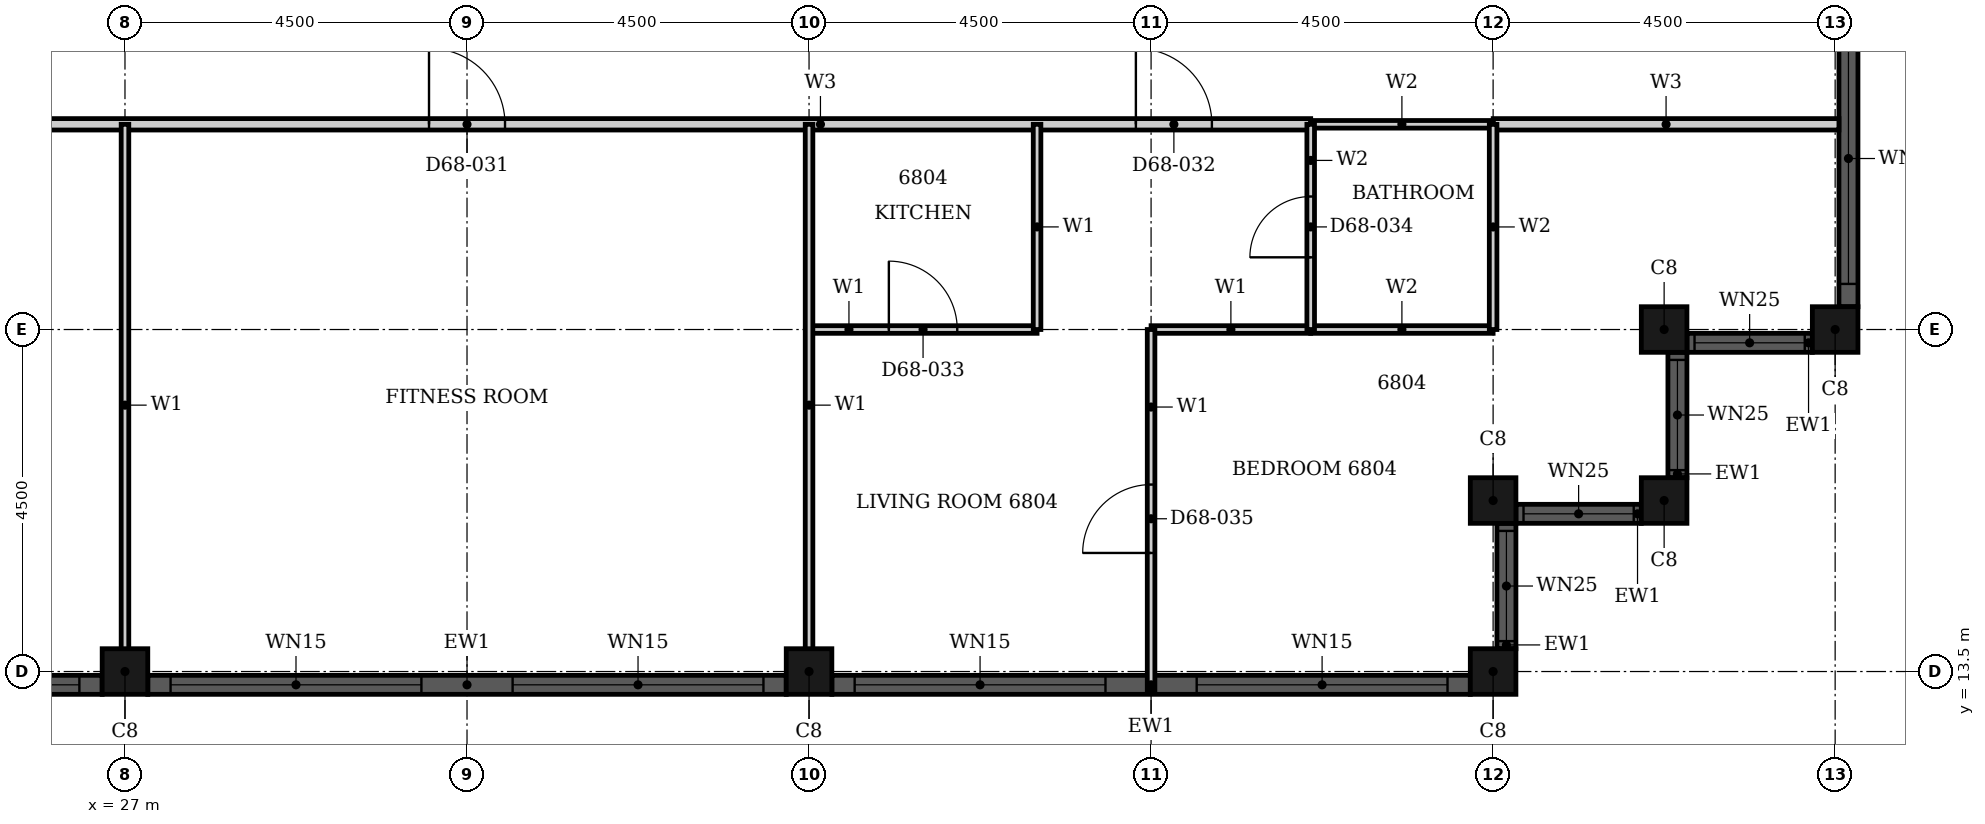
"""IFC4 building model, lengths in metres.
Left out: names, types, materials, properties, quantities, classifications, styles, units other than length and angle.
Written with IfcOpenShell. Run it as: python <this file> out.ifc"""

import sys

from ifc_helpers import new_model, si_unit, direction, frame, frame_2d, origin, origin_2d, place, context, subcontext, project, spatial, rectangle, hollow_rectangle, extrude, element, fill, save


model = new_model("IFC4")
c1 = context("Model", 3, precision=1e-05, world=origin(), true_north=direction((0.0, 1.0)))
c2 = subcontext(c1, "Body", "Model", "MODEL_VIEW")
j1 = project(units=[si_unit("LENGTHUNIT", "METRE"), si_unit("PLANEANGLEUNIT", "RADIAN")], contexts=[c1])
p1 = place(None, origin())
s1 = spatial("IfcSite", under=j1, at=p1, CompositionType="ELEMENT")
p2 = place(p1, origin())
s2 = spatial("IfcBuilding", under=s1, at=p2, CompositionType="ELEMENT")
p3 = place(p2, frame((0.0, 0.0, 267.5)))
s3 = spatial("IfcBuildingStorey", under=s2, at=p3, CompositionType="ELEMENT", Elevation=267.5)
for number, where, z_axis, x_axis in (
    (1, (27.0, 13.5, 0.0), (0.0, 0.0, 1.0), (1.0, 0.0, 0.0)),
    (2, (36.0, 13.5, 0.0), (0.0, 0.0, 1.0), (1.0, 0.0, 0.0)),
    (3, (45.0, 13.5, 0.0), (0.0, 0.0, 1.0), (1.0, 0.0, 0.0)),
    (4, (45.0, 15.75, 0.0), (0.0, 0.0, 1.0), (1.0, 0.0, 0.0)),
    (5, (47.25, 15.75, 0.0), (0.0, 0.0, 1.0), (1.0, 0.0, 0.0)),
    (6, (47.25, 18.0, 0.0), (0.0, 0.0, 1.0), (1.0, 0.0, 0.0)),
    (7, (49.5, 18.0, 0.0), (0.0, 0.0, 1.0), (1.0, 0.0, 0.0)),
):
    element("IfcColumn", number, at=place(p3, frame(where, z_axis=z_axis, x_axis=x_axis)), inside=s3, PredefinedType="COLUMN", context=c2, shape_type="SweptSolid", body=[
        extrude(hollow_rectangle(XDim=0.6, YDim=0.6, WallThickness=0.02, at=origin_2d()), origin(), (0.0, 0.0, 1.0), 3.7),
    ])
p4 = place(p3, frame((18.3, 13.325, 0.0), z_axis=(0.0, 0.0, 1.0), x_axis=(1.0, 0.0, 0.0)))
e8 = element("IfcWall", 8, at=p4, inside=s3, PredefinedType="SOLIDWALL", context=c2, shape_type="SweptSolid", body=[
    extrude(rectangle(XDim=8.4, YDim=0.25, at=frame_2d((4.2, 0.0))), origin(), (0.0, 0.0, 1.0), 3.7),
])
p5 = place(p4, frame((0.3, 0.0, 0.45)))
e9 = element("IfcOpeningElement", 9, at=p5, cuts=e8, PredefinedType="OPENING", context=c2, shape_type="SweptSolid", body=[
    extrude(rectangle(XDim=3.3, YDim=2.3, at=frame_2d((1.65, 1.15))), frame((0.0, 0.135, 0.0), z_axis=(0.0, -1.0, 0.0), x_axis=(1.0, 0.0, 0.0)), (0.0, 0.0, 1.0), 0.27),
])
p6 = place(p4, frame((4.8, 0.0, 0.45)))
e10 = element("IfcOpeningElement", 10, at=p6, cuts=e8, PredefinedType="OPENING", context=c2, shape_type="SweptSolid", body=[
    extrude(rectangle(XDim=3.3, YDim=2.3, at=frame_2d((1.65, 1.15))), frame((0.0, 0.135, 0.0), z_axis=(0.0, -1.0, 0.0), x_axis=(1.0, 0.0, 0.0)), (0.0, 0.0, 1.0), 0.27),
])
p7 = place(p3, frame((27.3, 13.325, 0.0), z_axis=(0.0, 0.0, 1.0), x_axis=(1.0, 0.0, 0.0)))
e11 = element("IfcWall", 11, at=p7, inside=s3, PredefinedType="SOLIDWALL", context=c2, shape_type="SweptSolid", body=[
    extrude(rectangle(XDim=8.4, YDim=0.25, at=frame_2d((4.2, 0.0))), origin(), (0.0, 0.0, 1.0), 3.7),
])
p8 = place(p7, frame((0.3, 0.0, 0.45)))
e12 = element("IfcOpeningElement", 12, at=p8, cuts=e11, PredefinedType="OPENING", context=c2, shape_type="SweptSolid", body=[
    extrude(rectangle(XDim=3.3, YDim=2.3, at=frame_2d((1.65, 1.15))), frame((0.0, 0.135, 0.0), z_axis=(0.0, -1.0, 0.0), x_axis=(1.0, 0.0, 0.0)), (0.0, 0.0, 1.0), 0.27),
])
p9 = place(p7, frame((4.8, 0.0, 0.45)))
e13 = element("IfcOpeningElement", 13, at=p9, cuts=e11, PredefinedType="OPENING", context=c2, shape_type="SweptSolid", body=[
    extrude(rectangle(XDim=3.3, YDim=2.3, at=frame_2d((1.65, 1.15))), frame((0.0, 0.135, 0.0), z_axis=(0.0, -1.0, 0.0), x_axis=(1.0, 0.0, 0.0)), (0.0, 0.0, 1.0), 0.27),
])
p10 = place(p3, frame((36.3, 13.325, 0.0), z_axis=(0.0, 0.0, 1.0), x_axis=(1.0, 0.0, 0.0)))
e14 = element("IfcWall", 14, at=p10, inside=s3, PredefinedType="SOLIDWALL", context=c2, shape_type="SweptSolid", body=[
    extrude(rectangle(XDim=8.4, YDim=0.25, at=frame_2d((4.2, 0.0))), origin(), (0.0, 0.0, 1.0), 3.7),
])
p11 = place(p10, frame((0.3, 0.0, 0.45)))
e15 = element("IfcOpeningElement", 15, at=p11, cuts=e14, PredefinedType="OPENING", context=c2, shape_type="SweptSolid", body=[
    extrude(rectangle(XDim=3.3, YDim=2.3, at=frame_2d((1.65, 1.15))), frame((0.0, 0.135, 0.0), z_axis=(0.0, -1.0, 0.0), x_axis=(1.0, 0.0, 0.0)), (0.0, 0.0, 1.0), 0.27),
])
p12 = place(p10, frame((4.8, 0.0, 0.45)))
e16 = element("IfcOpeningElement", 16, at=p12, cuts=e14, PredefinedType="OPENING", context=c2, shape_type="SweptSolid", body=[
    extrude(rectangle(XDim=3.3, YDim=2.3, at=frame_2d((1.65, 1.15))), frame((0.0, 0.135, 0.0), z_axis=(0.0, -1.0, 0.0), x_axis=(1.0, 0.0, 0.0)), (0.0, 0.0, 1.0), 0.27),
])
p13 = place(p3, frame((45.175, 13.8, 0.0), z_axis=(0.0, 0.0, 1.0), x_axis=(0.0, 1.0, 0.0)))
e17 = element("IfcWall", 17, at=p13, inside=s3, PredefinedType="SOLIDWALL", context=c2, shape_type="SweptSolid", body=[
    extrude(rectangle(XDim=1.65, YDim=0.25, at=frame_2d((0.825, 0.0))), origin(), (0.0, 0.0, 1.0), 3.7),
])
p14 = place(p13, frame((0.1, 0.0, 0.9)))
e18 = element("IfcOpeningElement", 18, at=p14, cuts=e17, PredefinedType="OPENING", context=c2, shape_type="SweptSolid", body=[
    extrude(rectangle(XDim=1.45, YDim=1.85, at=frame_2d((0.725, 0.925))), frame((0.0, 0.135, 0.0), z_axis=(0.0, -1.0, 0.0), x_axis=(1.0, 0.0, 0.0)), (0.0, 0.0, 1.0), 0.27),
])
p15 = place(p3, frame((45.3, 15.575, 0.0), z_axis=(0.0, 0.0, 1.0), x_axis=(1.0, 0.0, 0.0)))
e19 = element("IfcWall", 19, at=p15, inside=s3, PredefinedType="SOLIDWALL", context=c2, shape_type="SweptSolid", body=[
    extrude(rectangle(XDim=1.65, YDim=0.25, at=frame_2d((0.825, 0.0))), origin(), (0.0, 0.0, 1.0), 3.7),
])
p16 = place(p15, frame((0.1, 0.0, 0.9)))
e20 = element("IfcOpeningElement", 20, at=p16, cuts=e19, PredefinedType="OPENING", context=c2, shape_type="SweptSolid", body=[
    extrude(rectangle(XDim=1.45, YDim=1.85, at=frame_2d((0.725, 0.925))), frame((0.0, 0.135, 0.0), z_axis=(0.0, -1.0, 0.0), x_axis=(1.0, 0.0, 0.0)), (0.0, 0.0, 1.0), 0.27),
])
p17 = place(p3, frame((47.425, 16.05, 0.0), z_axis=(0.0, 0.0, 1.0), x_axis=(0.0, 1.0, 0.0)))
e21 = element("IfcWall", 21, at=p17, inside=s3, PredefinedType="SOLIDWALL", context=c2, shape_type="SweptSolid", body=[
    extrude(rectangle(XDim=1.65, YDim=0.25, at=frame_2d((0.825, 0.0))), origin(), (0.0, 0.0, 1.0), 3.7),
])
p18 = place(p17, frame((0.1, 0.0, 0.9)))
e22 = element("IfcOpeningElement", 22, at=p18, cuts=e21, PredefinedType="OPENING", context=c2, shape_type="SweptSolid", body=[
    extrude(rectangle(XDim=1.45, YDim=1.85, at=frame_2d((0.725, 0.925))), frame((0.0, 0.135, 0.0), z_axis=(0.0, -1.0, 0.0), x_axis=(1.0, 0.0, 0.0)), (0.0, 0.0, 1.0), 0.27),
])
p19 = place(p3, frame((47.55, 17.825, 0.0), z_axis=(0.0, 0.0, 1.0), x_axis=(1.0, 0.0, 0.0)))
e23 = element("IfcWall", 23, at=p19, inside=s3, PredefinedType="SOLIDWALL", context=c2, shape_type="SweptSolid", body=[
    extrude(rectangle(XDim=1.65, YDim=0.25, at=frame_2d((0.825, 0.0))), origin(), (0.0, 0.0, 1.0), 3.7),
])
p20 = place(p19, frame((0.1, 0.0, 0.9)))
e24 = element("IfcOpeningElement", 24, at=p20, cuts=e23, PredefinedType="OPENING", context=c2, shape_type="SweptSolid", body=[
    extrude(rectangle(XDim=1.45, YDim=1.85, at=frame_2d((0.725, 0.925))), frame((0.0, 0.135, 0.0), z_axis=(0.0, -1.0, 0.0), x_axis=(1.0, 0.0, 0.0)), (0.0, 0.0, 1.0), 0.27),
])
p21 = place(p3, frame((49.675, 18.3, 0.0), z_axis=(0.0, 0.0, 1.0), x_axis=(0.0, 1.0, 0.0)))
e25 = element("IfcWall", 25, at=p21, inside=s3, PredefinedType="SOLIDWALL", context=c2, shape_type="SweptSolid", body=[
    extrude(rectangle(XDim=8.4, YDim=0.25, at=frame_2d((4.2, 0.0))), origin(), (0.0, 0.0, 1.0), 3.7),
])
p22 = place(p21, frame((0.3, 0.0, 0.45)))
e26 = element("IfcOpeningElement", 26, at=p22, cuts=e25, PredefinedType="OPENING", context=c2, shape_type="SweptSolid", body=[
    extrude(rectangle(XDim=3.3, YDim=2.3, at=frame_2d((1.65, 1.15))), frame((0.0, 0.135, 0.0), z_axis=(0.0, -1.0, 0.0), x_axis=(1.0, 0.0, 0.0)), (0.0, 0.0, 1.0), 0.27),
])
p23 = place(p21, frame((4.8, 0.0, 0.45)))
e27 = element("IfcOpeningElement", 27, at=p23, cuts=e25, PredefinedType="OPENING", context=c2, shape_type="SweptSolid", body=[
    extrude(rectangle(XDim=3.3, YDim=2.3, at=frame_2d((1.65, 1.15))), frame((0.0, 0.135, 0.0), z_axis=(0.0, -1.0, 0.0), x_axis=(1.0, 0.0, 0.0)), (0.0, 0.0, 1.0), 0.27),
])
p24 = place(p3, frame((18.0, 20.7, 0.0), z_axis=(0.0, 0.0, 1.0), x_axis=(1.0, 0.0, 0.0)))
e28 = element("IfcWall", 28, at=p24, inside=s3, PredefinedType="PARTITIONING", context=c2, shape_type="SweptSolid", body=[
    extrude(rectangle(XDim=24.6, YDim=0.15, at=frame_2d((12.3, 0.0))), origin(), (0.0, 0.0, 1.0), 3.4),
])
p25 = place(p24, frame((4.0, 0.0, 0.0)))
e29 = element("IfcOpeningElement", 29, at=p25, cuts=e28, PredefinedType="OPENING", context=c2, shape_type="SweptSolid", body=[
    extrude(rectangle(XDim=1.0, YDim=2.1, at=frame_2d((0.5, 1.05))), frame((0.0, 0.085, 0.0), z_axis=(0.0, -1.0, 0.0), x_axis=(1.0, 0.0, 0.0)), (0.0, 0.0, 1.0), 0.17),
])
p26 = place(p24, frame((13.0, 0.0, 0.0)))
e30 = element("IfcOpeningElement", 30, at=p26, cuts=e28, PredefinedType="OPENING", context=c2, shape_type="SweptSolid", body=[
    extrude(rectangle(XDim=1.0, YDim=2.1, at=frame_2d((0.5, 1.05))), frame((0.0, 0.085, 0.0), z_axis=(0.0, -1.0, 0.0), x_axis=(1.0, 0.0, 0.0)), (0.0, 0.0, 1.0), 0.17),
])
p27 = place(p24, frame((22.3, 0.0, 0.0)))
e31 = element("IfcOpeningElement", 31, at=p27, cuts=e28, PredefinedType="OPENING", context=c2, shape_type="SweptSolid", body=[
    extrude(rectangle(XDim=1.0, YDim=2.2, at=frame_2d((0.5, 1.1))), frame((0.0, 0.085, 0.0), z_axis=(0.0, -1.0, 0.0), x_axis=(1.0, 0.0, 0.0)), (0.0, 0.0, 1.0), 0.17),
])
p28 = place(p3, frame((45.001, 20.7, 0.0), z_axis=(0.0, 0.0, 1.0), x_axis=(1.0, 0.0, 0.0)))
e32 = element("IfcWall", 32, at=p28, inside=s3, PredefinedType="PARTITIONING", context=c2, shape_type="SweptSolid", body=[
    extrude(rectangle(XDim=4.549, YDim=0.15, at=frame_2d((2.274, 0.0))), origin(), (0.0, 0.0, 1.0), 3.4),
])
p29 = place(p3, frame((40.5, 18.0, 0.0), z_axis=(0.0, 0.0, 1.0), x_axis=(1.0, 0.0, 0.0)))
e33 = element("IfcWall", 33, at=p29, inside=s3, PredefinedType="PARTITIONING", context=c2, shape_type="SweptSolid", body=[
    extrude(rectangle(XDim=2.1, YDim=0.1, at=frame_2d((1.05, 0.0))), origin(), (0.0, 0.0, 1.0), 3.4),
])
p30 = place(p3, frame((36.0, 18.0, 0.0), z_axis=(0.0, 0.0, 1.0), x_axis=(1.0, 0.0, 0.0)))
e34 = element("IfcWall", 34, at=p30, inside=s3, PredefinedType="PARTITIONING", context=c2, shape_type="SweptSolid", body=[
    extrude(rectangle(XDim=3.0, YDim=0.1, at=frame_2d((1.5, 0.0))), origin(), (0.0, 0.0, 1.0), 3.4),
])
p31 = place(p30, frame((1.05, 0.0, 0.0)))
e35 = element("IfcOpeningElement", 35, at=p31, cuts=e34, PredefinedType="OPENING", context=c2, shape_type="SweptSolid", body=[
    extrude(rectangle(XDim=0.9, YDim=2.1, at=frame_2d((0.45, 1.05))), frame((0.0, 0.06, 0.0), z_axis=(0.0, -1.0, 0.0), x_axis=(1.0, 0.0, 0.0)), (0.0, 0.0, 1.0), 0.12),
])
for number, where, z_axis, x_axis in (
    (36, (27.0, 13.31, 0.0), (0.0, 0.0, 1.0), (0.0, 1.0, 0.0)),
    (37, (36.0, 13.31, 0.0), (0.0, 0.0, 1.0), (0.0, 1.0, 0.0)),
):
    element("IfcWall", number, at=place(p3, frame(where, z_axis=z_axis, x_axis=x_axis)), inside=s3, PredefinedType="PARTITIONING", context=c2, shape_type="SweptSolid", body=[
        extrude(rectangle(XDim=7.39, YDim=0.1, at=frame_2d((3.695, 0.0))), origin(), (0.0, 0.0, 1.0), 3.4),
    ])
p32 = place(p3, frame((39.0, 18.0, 0.0), z_axis=(0.0, 0.0, 1.0), x_axis=(0.0, 1.0, 0.0)))
e38 = element("IfcWall", 38, at=p32, inside=s3, PredefinedType="PARTITIONING", context=c2, shape_type="SweptSolid", body=[
    extrude(rectangle(XDim=2.7, YDim=0.1, at=frame_2d((1.35, 0.0))), origin(), (0.0, 0.0, 1.0), 3.4),
])
p33 = place(p3, frame((40.5, 13.26, 0.0), z_axis=(0.0, 0.0, 1.0), x_axis=(0.0, 1.0, 0.0)))
e39 = element("IfcWall", 39, at=p33, inside=s3, PredefinedType="PARTITIONING", context=c2, shape_type="SweptSolid", body=[
    extrude(rectangle(XDim=4.74, YDim=0.1, at=frame_2d((2.37, 0.0))), origin(), (0.0, 0.0, 1.0), 3.4),
])
p34 = place(p33, frame((1.8, 0.0, 0.0)))
e40 = element("IfcOpeningElement", 40, at=p34, cuts=e39, PredefinedType="OPENING", context=c2, shape_type="SweptSolid", body=[
    extrude(rectangle(XDim=0.9, YDim=2.1, at=frame_2d((0.45, 1.05))), frame((0.0, 0.06, 0.0), z_axis=(0.0, -1.0, 0.0), x_axis=(1.0, 0.0, 0.0)), (0.0, 0.0, 1.0), 0.12),
])
for number, where, z_axis, x_axis in (
    (41, (42.6, 18.0, 0.0), (0.0, 0.0, 1.0), (1.0, 0.0, 0.0)),
    (42, (42.6, 20.7, 0.0), (0.0, 0.0, 1.0), (1.0, 0.0, 0.0)),
):
    element("IfcWall", number, at=place(p3, frame(where, z_axis=z_axis, x_axis=x_axis)), inside=s3, PredefinedType="PARTITIONING", context=c2, shape_type="SweptSolid", body=[
        extrude(rectangle(XDim=2.4, YDim=0.1, at=frame_2d((1.2, 0.0))), origin(), (0.0, 0.0, 1.0), 3.4),
    ])
p35 = place(p3, frame((42.6, 18.0, 0.0), z_axis=(0.0, 0.0, 1.0), x_axis=(0.0, 1.0, 0.0)))
e43 = element("IfcWall", 43, at=p35, inside=s3, PredefinedType="PARTITIONING", context=c2, shape_type="SweptSolid", body=[
    extrude(rectangle(XDim=2.7, YDim=0.1, at=frame_2d((1.35, 0.0))), origin(), (0.0, 0.0, 1.0), 3.4),
])
p36 = place(p35, frame((0.95, 0.0, 0.0)))
e44 = element("IfcOpeningElement", 44, at=p36, cuts=e43, PredefinedType="OPENING", context=c2, shape_type="SweptSolid", body=[
    extrude(rectangle(XDim=0.8, YDim=2.1, at=frame_2d((0.4, 1.05))), frame((0.0, 0.06, 0.0), z_axis=(0.0, -1.0, 0.0), x_axis=(1.0, 0.0, 0.0)), (0.0, 0.0, 1.0), 0.12),
])
p37 = place(p3, frame((45.0, 18.0, 0.0), z_axis=(0.0, 0.0, 1.0), x_axis=(0.0, 1.0, 0.0)))
e45 = element("IfcWall", 45, at=p37, inside=s3, PredefinedType="PARTITIONING", context=c2, shape_type="SweptSolid", body=[
    extrude(rectangle(XDim=2.699, YDim=0.1, at=frame_2d((1.35, 0.0))), origin(), (0.0, 0.0, 1.0), 3.4),
])
p38 = place(p6, origin())
e46 = element("IfcWindow", 46, at=p38, inside=s3, PartitioningType="SINGLE_PANEL", PredefinedType="WINDOW", context=c2, shape_type="SweptSolid", body=[
    extrude(rectangle(XDim=3.3, YDim=2.3, at=frame_2d((1.65, 1.15))), frame((0.0, 0.03, 0.0), z_axis=(0.0, -1.0, 0.0), x_axis=(1.0, 0.0, 0.0)), (0.0, 0.0, 1.0), 0.06),
])
fill(e10, e46)
p39 = place(p8, origin())
e47 = element("IfcWindow", 47, at=p39, inside=s3, PartitioningType="SINGLE_PANEL", PredefinedType="WINDOW", context=c2, shape_type="SweptSolid", body=[
    extrude(rectangle(XDim=3.3, YDim=2.3, at=frame_2d((1.65, 1.15))), frame((0.0, 0.03, 0.0), z_axis=(0.0, -1.0, 0.0), x_axis=(1.0, 0.0, 0.0)), (0.0, 0.0, 1.0), 0.06),
])
fill(e12, e47)
p40 = place(p9, origin())
e48 = element("IfcWindow", 48, at=p40, inside=s3, PartitioningType="SINGLE_PANEL", PredefinedType="WINDOW", context=c2, shape_type="SweptSolid", body=[
    extrude(rectangle(XDim=3.3, YDim=2.3, at=frame_2d((1.65, 1.15))), frame((0.0, 0.03, 0.0), z_axis=(0.0, -1.0, 0.0), x_axis=(1.0, 0.0, 0.0)), (0.0, 0.0, 1.0), 0.06),
])
fill(e13, e48)
p41 = place(p11, origin())
e49 = element("IfcWindow", 49, at=p41, inside=s3, PartitioningType="SINGLE_PANEL", PredefinedType="WINDOW", context=c2, shape_type="SweptSolid", body=[
    extrude(rectangle(XDim=3.3, YDim=2.3, at=frame_2d((1.65, 1.15))), frame((0.0, 0.03, 0.0), z_axis=(0.0, -1.0, 0.0), x_axis=(1.0, 0.0, 0.0)), (0.0, 0.0, 1.0), 0.06),
])
fill(e15, e49)
p42 = place(p12, origin())
e50 = element("IfcWindow", 50, at=p42, inside=s3, PartitioningType="SINGLE_PANEL", PredefinedType="WINDOW", context=c2, shape_type="SweptSolid", body=[
    extrude(rectangle(XDim=3.3, YDim=2.3, at=frame_2d((1.65, 1.15))), frame((0.0, 0.03, 0.0), z_axis=(0.0, -1.0, 0.0), x_axis=(1.0, 0.0, 0.0)), (0.0, 0.0, 1.0), 0.06),
])
fill(e16, e50)
p43 = place(p14, origin())
e51 = element("IfcWindow", 51, at=p43, inside=s3, PartitioningType="SINGLE_PANEL", PredefinedType="WINDOW", context=c2, shape_type="SweptSolid", body=[
    extrude(rectangle(XDim=1.45, YDim=1.85, at=frame_2d((0.725, 0.925))), frame((0.0, 0.03, 0.0), z_axis=(0.0, -1.0, 0.0), x_axis=(1.0, 0.0, 0.0)), (0.0, 0.0, 1.0), 0.06),
])
fill(e18, e51)
p44 = place(p16, origin())
e52 = element("IfcWindow", 52, at=p44, inside=s3, PartitioningType="SINGLE_PANEL", PredefinedType="WINDOW", context=c2, shape_type="SweptSolid", body=[
    extrude(rectangle(XDim=1.45, YDim=1.85, at=frame_2d((0.725, 0.925))), frame((0.0, 0.03, 0.0), z_axis=(0.0, -1.0, 0.0), x_axis=(1.0, 0.0, 0.0)), (0.0, 0.0, 1.0), 0.06),
])
fill(e20, e52)
p45 = place(p18, origin())
e53 = element("IfcWindow", 53, at=p45, inside=s3, PartitioningType="SINGLE_PANEL", PredefinedType="WINDOW", context=c2, shape_type="SweptSolid", body=[
    extrude(rectangle(XDim=1.45, YDim=1.85, at=frame_2d((0.725, 0.925))), frame((0.0, 0.03, 0.0), z_axis=(0.0, -1.0, 0.0), x_axis=(1.0, 0.0, 0.0)), (0.0, 0.0, 1.0), 0.06),
])
fill(e22, e53)
p46 = place(p20, origin())
e54 = element("IfcWindow", 54, at=p46, inside=s3, PartitioningType="SINGLE_PANEL", PredefinedType="WINDOW", context=c2, shape_type="SweptSolid", body=[
    extrude(rectangle(XDim=1.45, YDim=1.85, at=frame_2d((0.725, 0.925))), frame((0.0, 0.03, 0.0), z_axis=(0.0, -1.0, 0.0), x_axis=(1.0, 0.0, 0.0)), (0.0, 0.0, 1.0), 0.06),
])
fill(e24, e54)
p47 = place(p22, origin())
e55 = element("IfcWindow", 55, at=p47, inside=s3, PartitioningType="SINGLE_PANEL", PredefinedType="WINDOW", context=c2, shape_type="SweptSolid", body=[
    extrude(rectangle(XDim=3.3, YDim=2.3, at=frame_2d((1.65, 1.15))), frame((0.0, 0.03, 0.0), z_axis=(0.0, -1.0, 0.0), x_axis=(1.0, 0.0, 0.0)), (0.0, 0.0, 1.0), 0.06),
])
fill(e26, e55)
p48 = place(p26, origin())
e56 = element("IfcDoor", 56, at=p48, inside=s3, OperationType="SINGLE_SWING_LEFT", PredefinedType="DOOR", context=c2, shape_type="SweptSolid", body=[
    extrude(rectangle(XDim=1.0, YDim=2.1, at=frame_2d((0.5, 1.05))), frame((0.0, 0.025, 0.0), z_axis=(0.0, -1.0, 0.0), x_axis=(1.0, 0.0, 0.0)), (0.0, 0.0, 1.0), 0.05),
])
fill(e30, e56)
p49 = place(p27, origin())
e57 = element("IfcDoor", 57, at=p49, inside=s3, OperationType="SINGLE_SWING_LEFT", PredefinedType="DOOR", context=c2, shape_type="SweptSolid", body=[
    extrude(rectangle(XDim=1.0, YDim=2.2, at=frame_2d((0.5, 1.1))), frame((0.0, 0.025, 0.0), z_axis=(0.0, -1.0, 0.0), x_axis=(1.0, 0.0, 0.0)), (0.0, 0.0, 1.0), 0.05),
])
fill(e31, e57)
p50 = place(p31, origin())
e58 = element("IfcDoor", 58, at=p50, inside=s3, OperationType="SINGLE_SWING_RIGHT", PredefinedType="DOOR", context=c2, shape_type="SweptSolid", body=[
    extrude(rectangle(XDim=0.9, YDim=2.1, at=frame_2d((0.45, 1.05))), frame((0.0, 0.025, 0.0), z_axis=(0.0, -1.0, 0.0), x_axis=(1.0, 0.0, 0.0)), (0.0, 0.0, 1.0), 0.05),
])
fill(e35, e58)
p51 = place(p36, origin())
e59 = element("IfcDoor", 59, at=p51, inside=s3, OperationType="SINGLE_SWING_LEFT", PredefinedType="DOOR", context=c2, shape_type="SweptSolid", body=[
    extrude(rectangle(XDim=0.8, YDim=2.1, at=frame_2d((0.4, 1.05))), frame((0.0, 0.025, 0.0), z_axis=(0.0, -1.0, 0.0), x_axis=(1.0, 0.0, 0.0)), (0.0, 0.0, 1.0), 0.05),
])
fill(e44, e59)
p52 = place(p34, origin())
e60 = element("IfcDoor", 60, at=p52, inside=s3, OperationType="SINGLE_SWING_LEFT", PredefinedType="DOOR", context=c2, shape_type="SweptSolid", body=[
    extrude(rectangle(XDim=0.9, YDim=2.1, at=frame_2d((0.45, 1.05))), frame((0.0, 0.025, 0.0), z_axis=(0.0, -1.0, 0.0), x_axis=(1.0, 0.0, 0.0)), (0.0, 0.0, 1.0), 0.05),
])
fill(e40, e60)
save(model, sys.argv[1])
